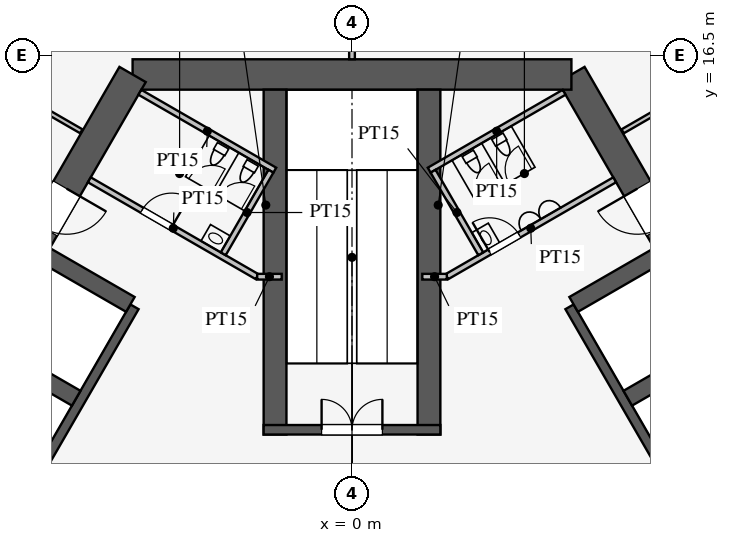
"""IFC4 building model, lengths in metres.
Left out: names, types, materials, properties, quantities, classifications, styles, units other than length and angle.
Written with IfcOpenShell. Run it as: python <this file> out.ifc"""

import sys

from ifc_helpers import new_model, si_unit, direction, frame, frame_2d, origin, place, context, subcontext, project, spatial, rectangle, extrude, element, fill, save


model = new_model("IFC4")
c1 = context("Model", 3, precision=1e-05, world=origin(), true_north=direction((0.0, 1.0)))
c2 = subcontext(c1, "Body", "Model", "MODEL_VIEW")
j1 = project(units=[si_unit("LENGTHUNIT", "METRE"), si_unit("PLANEANGLEUNIT", "RADIAN")], contexts=[c1])
p1 = place(None, origin())
s1 = spatial("IfcSite", under=j1, at=p1, CompositionType="ELEMENT")
p2 = place(p1, origin())
s2 = spatial("IfcBuilding", under=s1, at=p2, CompositionType="ELEMENT")
p3 = place(p2, frame((0.0, 0.0, 178.7)))
s3 = spatial("IfcBuildingStorey", under=s2, at=p3, CompositionType="ELEMENT", Elevation=178.7)
p4 = place(p3, frame((16.743, -3.0, 0.0), z_axis=(0.0, 0.0, 1.0), x_axis=(-0.500002442456, 0.866023993627, 0.0)))
e1 = element("IfcWall", 1, at=p4, inside=s3, PredefinedType="SHEAR", context=c2, shape_type="SweptSolid", body=[
    extrude(rectangle(XDim=21.939, YDim=0.8, at=frame_2d((10.97, 0.0))), origin(), (0.0, 0.0, 1.0), 6.0),
])
p5 = place(p4, frame((17.27, 0.0, 0.0)))
e2 = element("IfcOpeningElement", 2, at=p5, cuts=e1, PredefinedType="OPENING", context=c2, shape_type="SweptSolid", body=[
    extrude(rectangle(XDim=1.2, YDim=2.1, at=frame_2d((0.6, 1.05))), frame((0.0, 0.41, 0.0), z_axis=(0.0, -1.0, 0.0), x_axis=(1.0, 0.0, 0.0)), (0.0, 0.0, 1.0), 0.82),
])
p6 = place(p4, frame((3.47, 0.0, 0.0)))
e3 = element("IfcOpeningElement", 3, at=p6, cuts=e1, PredefinedType="OPENING", context=c2, shape_type="SweptSolid", body=[
    extrude(rectangle(XDim=1.2, YDim=2.1, at=frame_2d((0.6, 1.05))), frame((0.0, 0.41, 0.0), z_axis=(0.0, -1.0, 0.0), x_axis=(1.0, 0.0, 0.0)), (0.0, 0.0, 1.0), 0.82),
])
p7 = place(p3, frame((5.773, 16.0, 0.0), z_axis=(0.0, 0.0, 1.0), x_axis=(-1.0, 0.0, 0.0)))
e4 = element("IfcWall", 4, at=p7, inside=s3, PredefinedType="SHEAR", context=c2, shape_type="SweptSolid", body=[
    extrude(rectangle(XDim=11.547, YDim=0.8, at=frame_2d((5.773, 0.0))), origin(), (0.0, 0.0, 1.0), 6.0),
])
p8 = place(p3, frame((-5.773, 16.0, 0.0), z_axis=(0.0, 0.0, 1.0), x_axis=(-0.500002442456, -0.866023993627, 0.0)))
e5 = element("IfcWall", 5, at=p8, inside=s3, PredefinedType="SHEAR", context=c2, shape_type="SweptSolid", body=[
    extrude(rectangle(XDim=21.939, YDim=0.8, at=frame_2d((10.97, 0.0))), origin(), (0.0, 0.0, 1.0), 6.0),
])
p9 = place(p8, frame((17.27, 0.0, 0.0)))
e6 = element("IfcOpeningElement", 6, at=p9, cuts=e5, PredefinedType="OPENING", context=c2, shape_type="SweptSolid", body=[
    extrude(rectangle(XDim=1.2, YDim=2.1, at=frame_2d((0.6, 1.05))), frame((0.0, 0.41, 0.0), z_axis=(0.0, -1.0, 0.0), x_axis=(1.0, 0.0, 0.0)), (0.0, 0.0, 1.0), 0.82),
])
p10 = place(p8, frame((3.47, 0.0, 0.0)))
e7 = element("IfcOpeningElement", 7, at=p10, cuts=e5, PredefinedType="OPENING", context=c2, shape_type="SweptSolid", body=[
    extrude(rectangle(XDim=1.2, YDim=2.1, at=frame_2d((0.6, 1.05))), frame((0.0, 0.41, 0.0), z_axis=(0.0, -1.0, 0.0), x_axis=(1.0, 0.0, 0.0)), (0.0, 0.0, 1.0), 0.82),
])
p11 = place(p3, frame((11.424, 0.014, 0.0), z_axis=(0.0, 0.0, 1.0), x_axis=(-0.500001763848, 0.866024385424, 0.0)))
e8 = element("IfcWall", 8, at=p11, inside=s3, PredefinedType="SHEAR", context=c2, shape_type="SweptSolid", body=[
    extrude(rectangle(XDim=11.4, YDim=0.25, at=frame_2d((5.7, 0.0))), origin(), (0.0, 0.0, 1.0), 6.0),
])
p12 = place(p11, frame((0.975, 0.0, 0.0)))
e9 = element("IfcOpeningElement", 9, at=p12, cuts=e8, PredefinedType="OPENING", context=c2, shape_type="SweptSolid", body=[
    extrude(rectangle(XDim=0.9, YDim=2.1, at=frame_2d((0.45, 1.05))), frame((0.0, 0.135, 0.0), z_axis=(0.0, -1.0, 0.0), x_axis=(1.0, 0.0, 0.0)), (0.0, 0.0, 1.0), 0.27),
])
p13 = place(p11, frame((3.825, 0.0, 0.0)))
e10 = element("IfcOpeningElement", 10, at=p13, cuts=e8, PredefinedType="OPENING", context=c2, shape_type="SweptSolid", body=[
    extrude(rectangle(XDim=0.9, YDim=2.1, at=frame_2d((0.45, 1.05))), frame((0.0, 0.135, 0.0), z_axis=(0.0, -1.0, 0.0), x_axis=(1.0, 0.0, 0.0)), (0.0, 0.0, 1.0), 0.27),
])
p14 = place(p3, frame((7.257, 7.481, 0.0), z_axis=(0.0, 0.0, 1.0), x_axis=(0.866046643894, 0.499963209246, 0.0)))
e11 = element("IfcWall", 11, at=p14, inside=s3, PredefinedType="SHEAR", context=c2, shape_type="SweptSolid", body=[
    extrude(rectangle(XDim=2.575, YDim=0.45, at=frame_2d((1.288, 0.0))), origin(), (0.0, 0.0, 1.0), 6.0),
])
p15 = place(p3, frame((5.832, 9.949, 0.0), z_axis=(0.0, 0.0, 1.0), x_axis=(0.866029291668, 0.499993265928, 0.0)))
e12 = element("IfcWall", 12, at=p15, inside=s3, PredefinedType="SHEAR", context=c2, shape_type="SweptSolid", body=[
    extrude(rectangle(XDim=2.575, YDim=0.45, at=frame_2d((1.288, 0.0))), origin(), (0.0, 0.0, 1.0), 6.0),
])
p16 = place(p3, frame((-5.724, 9.886, 0.0), z_axis=(0.0, 0.0, 1.0), x_axis=(-0.500001763848, -0.866024385424, 0.0)))
e13 = element("IfcWall", 13, at=p16, inside=s3, PredefinedType="SHEAR", context=c2, shape_type="SweptSolid", body=[
    extrude(rectangle(XDim=11.4, YDim=0.25, at=frame_2d((5.7, 0.0))), origin(), (0.0, 0.0, 1.0), 6.0),
])
p17 = place(p16, frame((6.525, 0.0, 0.0)))
e14 = element("IfcOpeningElement", 14, at=p17, cuts=e13, PredefinedType="OPENING", context=c2, shape_type="SweptSolid", body=[
    extrude(rectangle(XDim=1.2, YDim=2.2, at=frame_2d((0.6, 1.1))), frame((0.0, 0.135, 0.0), z_axis=(0.0, -1.0, 0.0), x_axis=(1.0, 0.0, 0.0)), (0.0, 0.0, 1.0), 0.27),
])
p18 = place(p16, frame((9.375, 0.0, 0.0)))
e15 = element("IfcOpeningElement", 15, at=p18, cuts=e13, PredefinedType="OPENING", context=c2, shape_type="SweptSolid", body=[
    extrude(rectangle(XDim=1.2, YDim=2.2, at=frame_2d((0.6, 1.1))), frame((0.0, 0.135, 0.0), z_axis=(0.0, -1.0, 0.0), x_axis=(1.0, 0.0, 0.0)), (0.0, 0.0, 1.0), 0.27),
])
p19 = place(p3, frame((-5.832, 9.949, 0.0), z_axis=(0.0, 0.0, 1.0), x_axis=(-0.866029291668, 0.499993265928, 0.0)))
e16 = element("IfcWall", 16, at=p19, inside=s3, PredefinedType="SHEAR", context=c2, shape_type="SweptSolid", body=[
    extrude(rectangle(XDim=2.575, YDim=0.45, at=frame_2d((1.288, 0.0))), origin(), (0.0, 0.0, 1.0), 6.0),
])
p20 = place(p3, frame((-7.257, 7.481, 0.0), z_axis=(0.0, 0.0, 1.0), x_axis=(-0.866046643894, 0.499963209246, 0.0)))
e17 = element("IfcWall", 17, at=p20, inside=s3, PredefinedType="SHEAR", context=c2, shape_type="SweptSolid", body=[
    extrude(rectangle(XDim=2.575, YDim=0.45, at=frame_2d((1.288, 0.0))), origin(), (0.0, 0.0, 1.0), 6.0),
])
for number, where, z_axis, x_axis in (
    (18, (2.025, 6.525, 0.0), (0.0, 0.0, 1.0), (0.0, 1.0, 0.0)),
    (19, (-2.025, 6.525, 0.0), (0.0, 0.0, 1.0), (0.0, 1.0, 0.0)),
):
    element("IfcWall", number, at=place(p3, frame(where, z_axis=z_axis, x_axis=x_axis)), inside=s3, PredefinedType="SHEAR", context=c2, shape_type="SweptSolid", body=[
        extrude(rectangle(XDim=9.075, YDim=0.6, at=frame_2d((4.538, 0.0))), origin(), (0.0, 0.0, 1.0), 6.0),
    ])
p21 = place(p3, frame((2.325, 6.65, 0.0), z_axis=(0.0, 0.0, 1.0), x_axis=(-1.0, 0.0, 0.0)))
e20 = element("IfcWall", 20, at=p21, inside=s3, PredefinedType="SHEAR", context=c2, shape_type="SweptSolid", body=[
    extrude(rectangle(XDim=4.65, YDim=0.25, at=frame_2d((2.325, 0.0))), origin(), (0.0, 0.0, 1.0), 6.0),
])
p22 = place(p21, frame((1.525, 0.0, 0.0)))
e21 = element("IfcOpeningElement", 21, at=p22, cuts=e20, PredefinedType="OPENING", context=c2, shape_type="SweptSolid", body=[
    extrude(rectangle(XDim=1.6, YDim=2.1, at=frame_2d((0.8, 1.05))), frame((0.0, 0.135, 0.0), z_axis=(0.0, -1.0, 0.0), x_axis=(1.0, 0.0, 0.0)), (0.0, 0.0, 1.0), 0.27),
])
p23 = place(p3, frame((2.495, 10.678, 0.0), z_axis=(0.0, 0.0, 1.0), x_axis=(0.86602216432, 0.500005610874, 0.0)))
e22 = element("IfcWall", 22, at=p23, inside=s3, PredefinedType="PARTITIONING", context=c2, shape_type="SweptSolid", body=[
    extrude(rectangle(XDim=5.1, YDim=0.15, at=frame_2d((2.55, 0.0))), origin(), (0.0, 0.0, 1.0), 5.8),
])
p24 = place(p23, frame((1.3, 0.0, 0.0)))
e23 = element("IfcOpeningElement", 23, at=p24, cuts=e22, PredefinedType="OPENING", context=c2, shape_type="SweptSolid", body=[
    extrude(rectangle(XDim=0.9, YDim=2.1, at=frame_2d((0.45, 1.05))), frame((0.0, 0.085, 0.0), z_axis=(0.0, -1.0, 0.0), x_axis=(1.0, 0.0, 0.0)), (0.0, 0.0, 1.0), 0.17),
])
p25 = place(p3, frame((-2.495, 10.678, 0.0), z_axis=(0.0, 0.0, 1.0), x_axis=(-0.86602216432, 0.500005610874, 0.0)))
e24 = element("IfcWall", 24, at=p25, inside=s3, PredefinedType="PARTITIONING", context=c2, shape_type="SweptSolid", body=[
    extrude(rectangle(XDim=5.1, YDim=0.15, at=frame_2d((2.55, 0.0))), origin(), (0.0, 0.0, 1.0), 5.8),
])
p26 = place(p25, frame((2.6, 0.0, 0.0)))
e25 = element("IfcOpeningElement", 25, at=p26, cuts=e24, PredefinedType="OPENING", context=c2, shape_type="SweptSolid", body=[
    extrude(rectangle(XDim=0.9, YDim=2.1, at=frame_2d((0.45, 1.05))), frame((0.0, 0.085, 0.0), z_axis=(0.0, -1.0, 0.0), x_axis=(1.0, 0.0, 0.0)), (0.0, 0.0, 1.0), 0.17),
])
for number, where, z_axis, x_axis in (
    (26, (2.495, 10.678, 0.0), (0.0, 0.0, 1.0), (-1.0, 0.0, 0.0)),
    (27, (-2.495, 10.678, 0.0), (0.0, 0.0, 1.0), (1.0, 0.0, 0.0)),
):
    element("IfcWall", number, at=place(p3, frame(where, z_axis=z_axis, x_axis=x_axis)), inside=s3, PredefinedType="PARTITIONING", context=c2, shape_type="SweptSolid", body=[
        extrude(rectangle(XDim=0.645, YDim=0.15, at=frame_2d((0.323, 0.0))), origin(), (0.0, 0.0, 1.0), 5.8),
    ])
p27 = place(p3, frame((2.031, 13.482, 0.0), z_axis=(0.0, 0.0, 1.0), x_axis=(0.866050731258, 0.499956128963, 0.0)))
e28 = element("IfcWall", 28, at=p27, inside=s3, PredefinedType="PARTITIONING", context=c2, shape_type="SweptSolid", body=[
    extrude(rectangle(XDim=4.1, YDim=0.15, at=frame_2d((2.05, 0.0))), origin(), (0.0, 0.0, 1.0), 5.8),
])
p28 = place(p3, frame((3.389, 11.281, 0.0), z_axis=(0.0, 0.0, 1.0), x_axis=(-0.499989096993, 0.866031698547, 0.0)))
e29 = element("IfcWall", 29, at=p28, inside=s3, PredefinedType="PARTITIONING", context=c2, shape_type="SweptSolid", body=[
    extrude(rectangle(XDim=2.51, YDim=0.15, at=frame_2d((1.255, 0.0))), origin(), (0.0, 0.0, 1.0), 5.8),
])
p29 = place(p3, frame((-2.031, 13.482, 0.0), z_axis=(0.0, 0.0, 1.0), x_axis=(-0.866050731258, 0.499956128963, 0.0)))
e30 = element("IfcWall", 30, at=p29, inside=s3, PredefinedType="PARTITIONING", context=c2, shape_type="SweptSolid", body=[
    extrude(rectangle(XDim=4.1, YDim=0.15, at=frame_2d((2.05, 0.0))), origin(), (0.0, 0.0, 1.0), 5.8),
])
p30 = place(p3, frame((-3.389, 11.281, 0.0), z_axis=(0.0, 0.0, 1.0), x_axis=(0.499989096993, 0.866031698547, 0.0)))
e31 = element("IfcWall", 31, at=p30, inside=s3, PredefinedType="PARTITIONING", context=c2, shape_type="SweptSolid", body=[
    extrude(rectangle(XDim=2.51, YDim=0.15, at=frame_2d((1.255, 0.0))), origin(), (0.0, 0.0, 1.0), 5.8),
])
p31 = place(p3, frame((0.0, 16.4, 0.0), z_axis=(0.0, 0.0, 1.0), x_axis=(0.0, 1.0, 0.0)))
e32 = element("IfcWall", 32, at=p31, inside=s3, PredefinedType="PARTITIONING", context=c2, shape_type="SweptSolid", body=[
    extrude(rectangle(XDim=14.95, YDim=0.15, at=frame_2d((7.475, 0.0))), origin(), (0.0, 0.0, 1.0), 4.2),
])
p32 = place(p3, frame((7.122, 14.504, 0.0), z_axis=(0.0, 0.0, 1.0), x_axis=(0.866025583565, 0.49999968861, 0.0)))
e33 = element("IfcWall", 33, at=p32, inside=s3, PredefinedType="PARTITIONING", context=c2, shape_type="SweptSolid", body=[
    extrude(rectangle(XDim=10.393, YDim=0.12, at=frame_2d((5.196, 0.0))), origin(), (0.0, 0.0, 1.0), 2.9),
])
p33 = place(p32, frame((2.35, 0.0, 0.0)))
e34 = element("IfcOpeningElement", 34, at=p33, cuts=e33, PredefinedType="OPENING", context=c2, shape_type="SweptSolid", body=[
    extrude(rectangle(XDim=0.9, YDim=2.1, at=frame_2d((0.45, 1.05))), frame((0.0, 0.07, 0.0), z_axis=(0.0, -1.0, 0.0), x_axis=(1.0, 0.0, 0.0)), (0.0, 0.0, 1.0), 0.14),
])
p34 = place(p3, frame((-7.122, 14.504, 0.0), z_axis=(0.0, 0.0, 1.0), x_axis=(-0.866025583565, 0.49999968861, 0.0)))
e35 = element("IfcWall", 35, at=p34, inside=s3, PredefinedType="PARTITIONING", context=c2, shape_type="SweptSolid", body=[
    extrude(rectangle(XDim=10.393, YDim=0.12, at=frame_2d((5.196, 0.0))), origin(), (0.0, 0.0, 1.0), 2.9),
])
p35 = place(p34, frame((2.35, 0.0, 0.0)))
e36 = element("IfcOpeningElement", 36, at=p35, cuts=e35, PredefinedType="OPENING", context=c2, shape_type="SweptSolid", body=[
    extrude(rectangle(XDim=0.9, YDim=2.1, at=frame_2d((0.45, 1.05))), frame((0.0, 0.07, 0.0), z_axis=(0.0, -1.0, 0.0), x_axis=(1.0, 0.0, 0.0)), (0.0, 0.0, 1.0), 0.14),
])
p36 = place(p24, origin())
e37 = element("IfcDoor", 37, at=p36, inside=s3, OperationType="SINGLE_SWING_LEFT", PredefinedType="DOOR", context=c2, shape_type="SweptSolid", body=[
    extrude(rectangle(XDim=0.9, YDim=2.1, at=frame_2d((0.45, 1.05))), frame((0.0, 0.025, 0.0), z_axis=(0.0, -1.0, 0.0), x_axis=(1.0, 0.0, 0.0)), (0.0, 0.0, 1.0), 0.05),
])
fill(e23, e37)
p37 = place(p26, frame((0.9, 0.0, 0.0), z_axis=(0.0, 0.0, 1.0), x_axis=(-1.0, 0.0, 0.0)))
e38 = element("IfcDoor", 38, at=p37, inside=s3, OperationType="SINGLE_SWING_RIGHT", PredefinedType="DOOR", context=c2, shape_type="SweptSolid", body=[
    extrude(rectangle(XDim=0.9, YDim=2.1, at=frame_2d((0.45, 1.05))), frame((0.0, 0.025, 0.0), z_axis=(0.0, -1.0, 0.0), x_axis=(1.0, 0.0, 0.0)), (0.0, 0.0, 1.0), 0.05),
])
fill(e25, e38)
p38 = place(p22, frame((1.6, 0.0, 0.0), z_axis=(0.0, 0.0, 1.0), x_axis=(-1.0, 0.0, 0.0)))
e39 = element("IfcDoor", 39, at=p38, inside=s3, OperationType="DOUBLE_DOOR_SINGLE_SWING", PredefinedType="DOOR", context=c2, shape_type="SweptSolid", body=[
    extrude(rectangle(XDim=1.6, YDim=2.1, at=frame_2d((0.8, 1.05))), frame((0.0, 0.025, 0.0), z_axis=(0.0, -1.0, 0.0), x_axis=(1.0, 0.0, 0.0)), (0.0, 0.0, 1.0), 0.05),
])
fill(e21, e39)
p39 = place(p5, origin())
e40 = element("IfcDoor", 40, at=p39, inside=s3, OperationType="SINGLE_SWING_RIGHT", PredefinedType="DOOR", context=c2, shape_type="SweptSolid", body=[
    extrude(rectangle(XDim=1.2, YDim=2.1, at=frame_2d((0.6, 1.05))), frame((0.0, 0.025, 0.0), z_axis=(0.0, -1.0, 0.0), x_axis=(1.0, 0.0, 0.0)), (0.0, 0.0, 1.0), 0.05),
])
fill(e2, e40)
p40 = place(p10, origin())
e41 = element("IfcDoor", 41, at=p40, inside=s3, OperationType="SINGLE_SWING_LEFT", PredefinedType="DOOR", context=c2, shape_type="SweptSolid", body=[
    extrude(rectangle(XDim=1.2, YDim=2.1, at=frame_2d((0.6, 1.05))), frame((0.0, 0.025, 0.0), z_axis=(0.0, -1.0, 0.0), x_axis=(1.0, 0.0, 0.0)), (0.0, 0.0, 1.0), 0.05),
])
fill(e7, e41)
save(model, sys.argv[1])
